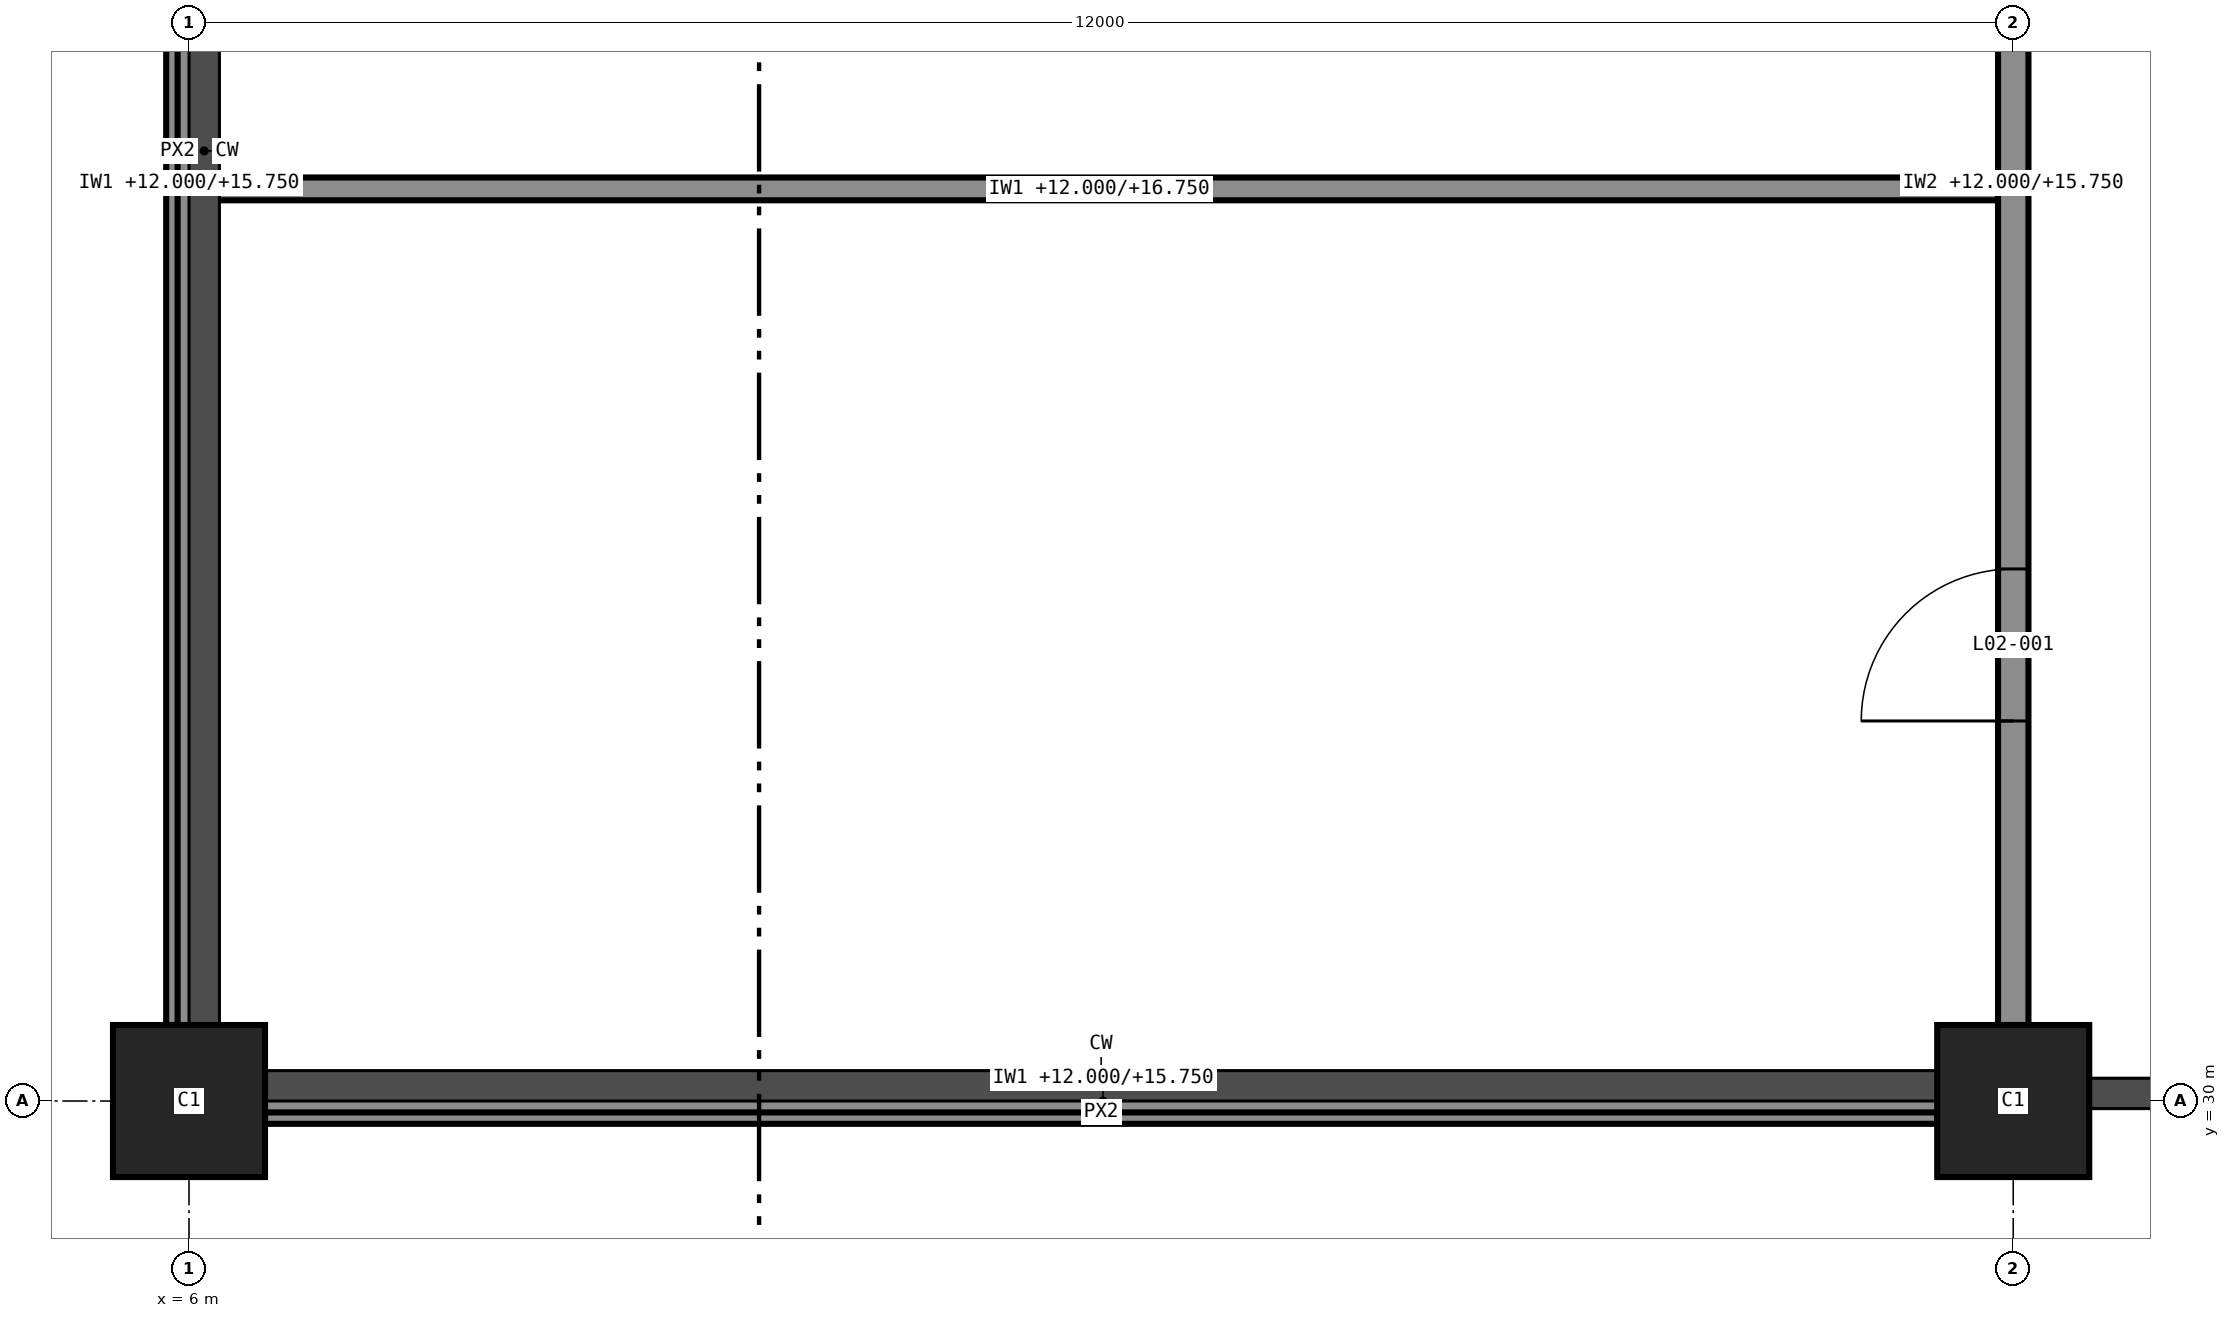
"""IFC4 building model, lengths in metres.
Left out: names, types, materials, properties, quantities, classifications, styles, units other than length and angle.
Written with IfcOpenShell. Run it as: python <this file> out.ifc"""

import sys

from ifc_helpers import new_model, si_unit, direction, frame, frame_2d, origin, origin_2d, place, context, subcontext, project, spatial, rectangle, extrude, element, fill, save


model = new_model("IFC4")
c1 = context("Model", 3, precision=1e-05, world=origin(), true_north=direction((0.0, 1.0)))
c2 = subcontext(c1, "Body", "Model", "MODEL_VIEW")
j1 = project(units=[si_unit("LENGTHUNIT", "METRE"), si_unit("PLANEANGLEUNIT", "RADIAN")], contexts=[c1])
p1 = place(None, origin())
s1 = spatial("IfcSite", under=j1, at=p1, CompositionType="ELEMENT")
p2 = place(p1, origin())
s2 = spatial("IfcBuilding", under=s1, at=p2, CompositionType="ELEMENT")
p3 = place(p2, frame((0.0, 0.0, 12.0)))
s3 = spatial("IfcBuildingStorey", under=s2, at=p3, CompositionType="ELEMENT", Elevation=12.0)
for number, where, z_axis, x_axis in (
    (1, (6.0, 30.0, 0.0), (0.0, 0.0, 1.0), (1.0, 0.0, 0.0)),
    (2, (18.0, 30.0, 0.0), (0.0, 0.0, 1.0), (1.0, 0.0, 0.0)),
):
    element("IfcColumn", number, at=place(p3, frame(where, z_axis=z_axis, x_axis=x_axis)), inside=s3, PredefinedType="COLUMN", context=c2, shape_type="SweptSolid", body=[
        extrude(rectangle(XDim=1.0, YDim=1.0, at=origin_2d()), origin(), (0.0, 0.0, 1.0), 5.0),
    ])
p4 = place(p3, frame((5.925, 42.0, 4.75), z_axis=(0.0, 0.0, 1.0), x_axis=(0.0, -1.0, 0.0)))
e3 = element("IfcWall", 3, at=p4, inside=s3, PredefinedType="STANDARD", context=c2, shape_type="SweptSolid", body=[
    extrude(rectangle(XDim=11.5, YDim=0.15, at=frame_2d((5.75, 0.0))), origin(), (0.0, 0.0, 1.0), 0.25),
])
p5 = place(p3, frame((6.5, 29.925, 4.75), z_axis=(0.0, 0.0, 1.0), x_axis=(1.0, 0.0, 0.0)))
e4 = element("IfcWall", 4, at=p5, inside=s3, PredefinedType="STANDARD", context=c2, shape_type="SweptSolid", body=[
    extrude(rectangle(XDim=11.0, YDim=0.15, at=frame_2d((5.5, 0.0))), origin(), (0.0, 0.0, 1.0), 0.25),
])
p6 = place(p3, frame((5.925, 30.0, 0.0), z_axis=(0.0, 0.0, 1.0), x_axis=(1.0, 0.0, 0.0)))
e5 = element("IfcWall", 5, at=p6, inside=s3, PredefinedType="PARTITIONING", context=c2, shape_type="SweptSolid", body=[
    extrude(rectangle(XDim=12.175, YDim=0.15, at=frame_2d((6.087, 0.0))), origin(), (0.0, 0.0, 1.0), 3.75),
])
p7 = place(p3, frame((6.075, 36.0, 0.0), z_axis=(0.0, 0.0, 1.0), x_axis=(1.0, 0.0, 0.0)))
e6 = element("IfcWall", 6, at=p7, inside=s3, PredefinedType="PARTITIONING", context=c2, shape_type="SweptSolid", body=[
    extrude(rectangle(XDim=11.825, YDim=0.15, at=frame_2d((5.913, 0.0))), origin(), (0.0, 0.0, 1.0), 4.75),
])
p8 = place(p3, frame((6.0, 30.075, 0.0), z_axis=(0.0, 0.0, 1.0), x_axis=(0.0, 1.0, 0.0)))
e7 = element("IfcWall", 7, at=p8, inside=s3, PredefinedType="PARTITIONING", context=c2, shape_type="SweptSolid", body=[
    extrude(rectangle(XDim=11.925, YDim=0.15, at=frame_2d((5.962, 0.0))), origin(), (0.0, 0.0, 1.0), 3.75),
])
p9 = place(p3, frame((18.0, 30.075, 0.0), z_axis=(0.0, 0.0, 1.0), x_axis=(0.0, 1.0, 0.0)))
e8 = element("IfcWall", 8, at=p9, inside=s3, PredefinedType="PARTITIONING", context=c2, shape_type="SweptSolid", body=[
    extrude(rectangle(XDim=11.925, YDim=0.2, at=frame_2d((5.962, 0.0))), origin(), (0.0, 0.0, 1.0), 3.75),
])
p10 = place(p9, frame((2.425, 0.0, 0.0)))
e9 = element("IfcOpeningElement", 9, at=p10, cuts=e8, PredefinedType="OPENING", context=c2, shape_type="SweptSolid", body=[
    extrude(rectangle(XDim=1.0, YDim=2.1, at=frame_2d((0.5, 1.05))), frame((0.0, 0.11, 0.0), z_axis=(0.0, -1.0, 0.0), x_axis=(1.0, 0.0, 0.0)), (0.0, 0.0, 1.0), 0.22),
])
p11 = place(p9, frame((8.425, 0.0, 0.0)))
e10 = element("IfcOpeningElement", 10, at=p11, cuts=e8, PredefinedType="OPENING", context=c2, shape_type="SweptSolid", body=[
    extrude(rectangle(XDim=1.0, YDim=2.1, at=frame_2d((0.5, 1.05))), frame((0.0, 0.11, 0.0), z_axis=(0.0, -1.0, 0.0), x_axis=(1.0, 0.0, 0.0)), (0.0, 0.0, 1.0), 0.22),
])
p12 = place(p10, origin())
e11 = element("IfcDoor", 11, at=p12, inside=s3, OperationType="SINGLE_SWING_RIGHT", PredefinedType="DOOR", context=c2, shape_type="SweptSolid", body=[
    extrude(rectangle(XDim=1.0, YDim=2.1, at=frame_2d((0.5, 1.05))), frame((0.0, 0.025, 0.0), z_axis=(0.0, -1.0, 0.0), x_axis=(1.0, 0.0, 0.0)), (0.0, 0.0, 1.0), 0.05),
])
fill(e9, e11)
save(model, sys.argv[1])
